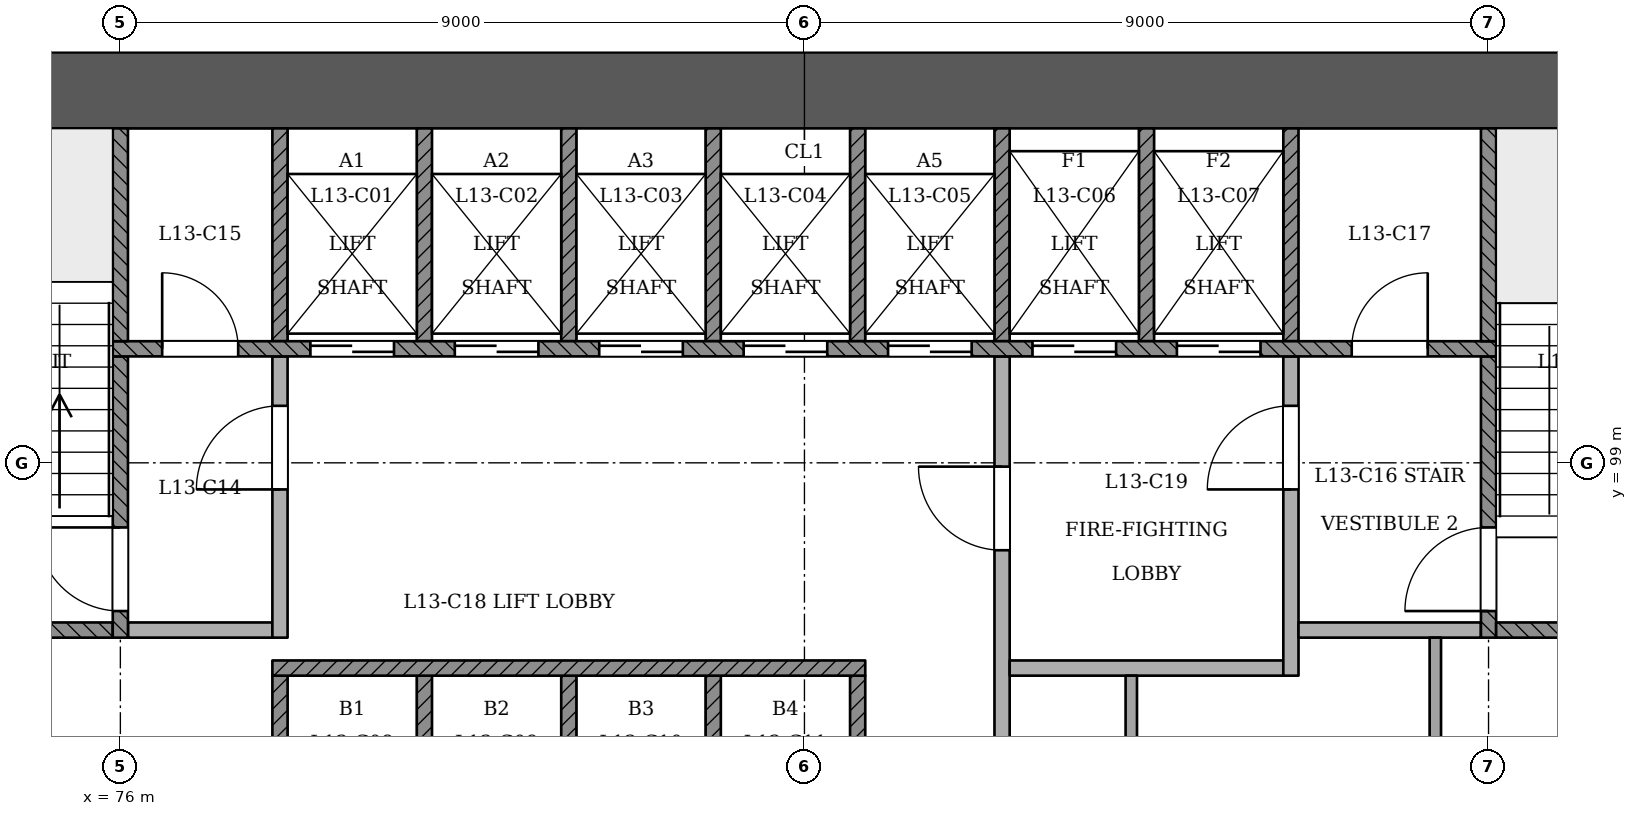
"""IFC4 building model, lengths in metres.
Left out: names, types, materials, properties, quantities, classifications, styles, units other than length and angle.
Written with IfcOpenShell. Run it as: python <this file> out.ifc"""

import sys

from ifc_helpers import new_model, si_unit, direction, frame, frame_2d, origin, place, context, subcontext, project, spatial, rectangle, extrude, element, fill, save


model = new_model("IFC4")
c1 = context("Model", 3, precision=1e-05, world=origin(), true_north=direction((0.0, 1.0)))
c2 = subcontext(c1, "Body", "Model", "MODEL_VIEW")
j1 = project(units=[si_unit("LENGTHUNIT", "METRE"), si_unit("PLANEANGLEUNIT", "RADIAN")], contexts=[c1])
p1 = place(None, origin())
s1 = spatial("IfcSite", under=j1, at=p1, CompositionType="ELEMENT")
p2 = place(p1, origin())
s2 = spatial("IfcBuilding", under=s1, at=p2, CompositionType="ELEMENT")
p3 = place(p2, frame((0.0, 0.0, 55.8)))
s3 = spatial("IfcBuildingStorey", under=s2, at=p3, CompositionType="ELEMENT", Elevation=55.8)
p4 = place(p3, frame((97.5, 103.9, 0.0), z_axis=(0.0, 0.0, 1.0), x_axis=(-1.0, 0.0, 0.0)))
e1 = element("IfcWall", 1, at=p4, inside=s3, PredefinedType="SHEAR", context=c2, shape_type="SweptSolid", body=[
    extrude(rectangle(XDim=25.5, YDim=1.0, at=frame_2d((12.75, 0.0))), origin(), (0.0, 0.0, 1.0), 3.6),
])
p5 = place(p3, frame((85.99, 58.932, 0.0), z_axis=(0.0, 0.0, 1.0), x_axis=(0.500001547762, 0.866024510182, 0.0)))
e2 = element("IfcWall", 2, at=p5, inside=s3, PredefinedType="PARTITIONING", context=c2, shape_type="SweptSolid", body=[
    extrude(rectangle(XDim=42.454, YDim=0.15, at=frame_2d((21.227, 0.0))), origin(), (0.0, 0.0, 1.0), 2.7),
])
p6 = place(p5, frame((3.577, 0.0, 0.0)))
e3 = element("IfcOpeningElement", 3, at=p6, cuts=e2, PredefinedType="OPENING", context=c2, shape_type="SweptSolid", body=[
    extrude(rectangle(XDim=1.2, YDim=2.1, at=frame_2d((0.6, 1.05))), frame((0.0, 0.085, 0.0), z_axis=(0.0, -1.0, 0.0), x_axis=(1.0, 0.0, 0.0)), (0.0, 0.0, 1.0), 0.171),
])
p7 = place(p5, frame((11.134, 0.0, 0.0)))
e4 = element("IfcOpeningElement", 4, at=p7, cuts=e2, PredefinedType="OPENING", context=c2, shape_type="SweptSolid", body=[
    extrude(rectangle(XDim=1.0, YDim=2.1, at=frame_2d((0.5, 1.05))), frame((0.0, 0.085, 0.0), z_axis=(0.0, -1.0, 0.0), x_axis=(1.0, 0.0, 0.0)), (0.0, 0.0, 1.0), 0.171),
])
p8 = place(p5, frame((13.575, 0.0, 0.0)))
e5 = element("IfcOpeningElement", 5, at=p8, cuts=e2, PredefinedType="OPENING", context=c2, shape_type="SweptSolid", body=[
    extrude(rectangle(XDim=1.0, YDim=2.1, at=frame_2d((0.5, 1.05))), frame((0.0, 0.085, 0.0), z_axis=(0.0, -1.0, 0.0), x_axis=(1.0, 0.0, 0.0)), (0.0, 0.0, 1.0), 0.171),
])
p9 = place(p5, frame((20.134, 0.0, 0.0)))
e6 = element("IfcOpeningElement", 6, at=p9, cuts=e2, PredefinedType="OPENING", context=c2, shape_type="SweptSolid", body=[
    extrude(rectangle(XDim=1.0, YDim=2.1, at=frame_2d((0.5, 1.05))), frame((0.0, 0.085, 0.0), z_axis=(0.0, -1.0, 0.0), x_axis=(1.0, 0.0, 0.0)), (0.0, 0.0, 1.0), 0.171),
])
p10 = place(p5, frame((22.575, 0.0, 0.0)))
e7 = element("IfcOpeningElement", 7, at=p10, cuts=e2, PredefinedType="OPENING", context=c2, shape_type="SweptSolid", body=[
    extrude(rectangle(XDim=1.0, YDim=2.1, at=frame_2d((0.5, 1.05))), frame((0.0, 0.085, 0.0), z_axis=(0.0, -1.0, 0.0), x_axis=(1.0, 0.0, 0.0)), (0.0, 0.0, 1.0), 0.171),
])
p11 = place(p5, frame((29.134, 0.0, 0.0)))
e8 = element("IfcOpeningElement", 8, at=p11, cuts=e2, PredefinedType="OPENING", context=c2, shape_type="SweptSolid", body=[
    extrude(rectangle(XDim=1.0, YDim=2.1, at=frame_2d((0.5, 1.05))), frame((0.0, 0.085, 0.0), z_axis=(0.0, -1.0, 0.0), x_axis=(1.0, 0.0, 0.0)), (0.0, 0.0, 1.0), 0.171),
])
p12 = place(p5, frame((31.575, 0.0, 0.0)))
e9 = element("IfcOpeningElement", 9, at=p12, cuts=e2, PredefinedType="OPENING", context=c2, shape_type="SweptSolid", body=[
    extrude(rectangle(XDim=1.0, YDim=2.1, at=frame_2d((0.5, 1.05))), frame((0.0, 0.085, 0.0), z_axis=(0.0, -1.0, 0.0), x_axis=(1.0, 0.0, 0.0)), (0.0, 0.0, 1.0), 0.171),
])
p13 = place(p5, frame((38.134, 0.0, 0.0)))
e10 = element("IfcOpeningElement", 10, at=p13, cuts=e2, PredefinedType="OPENING", context=c2, shape_type="SweptSolid", body=[
    extrude(rectangle(XDim=1.0, YDim=2.1, at=frame_2d((0.5, 1.05))), frame((0.0, 0.085, 0.0), z_axis=(0.0, -1.0, 0.0), x_axis=(1.0, 0.0, 0.0)), (0.0, 0.0, 1.0), 0.171),
])
p14 = place(p5, frame((41.161, 0.0, 0.0)))
e11 = element("IfcOpeningElement", 11, at=p14, cuts=e2, PredefinedType="OPENING", context=c2, shape_type="SweptSolid", body=[
    extrude(rectangle(XDim=1.0, YDim=2.1, at=frame_2d((0.5, 1.05))), frame((0.0, 0.085, 0.0), z_axis=(0.0, -1.0, 0.0), x_axis=(1.0, 0.0, 0.0)), (0.0, 0.0, 1.0), 0.171),
])
for number, where, z_axis, x_axis in (
    (12, (78.1, 93.4, 0.0), (0.0, 0.0, 1.0), (0.0, 1.0, 0.0)),
    (13, (80.0, 93.4, 0.0), (0.0, 0.0, 1.0), (0.0, 1.0, 0.0)),
    (14, (81.9, 93.4, 0.0), (0.0, 0.0, 1.0), (0.0, 1.0, 0.0)),
    (15, (83.8, 93.4, 0.0), (0.0, 0.0, 1.0), (0.0, 1.0, 0.0)),
    (16, (85.7, 93.4, 0.0), (0.0, 0.0, 1.0), (0.0, 1.0, 0.0)),
):
    element("IfcWall", number, at=place(p3, frame(where, z_axis=z_axis, x_axis=x_axis)), inside=s3, PredefinedType="SOLIDWALL", context=c2, shape_type="SweptSolid", body=[
        extrude(rectangle(XDim=2.8, YDim=0.2, at=frame_2d((1.4, 0.0))), origin(), (0.0, 0.0, 1.0), 3.1),
    ])
p15 = place(p3, frame((87.6, 93.4, 0.0), z_axis=(0.0, 0.0, 1.0), x_axis=(0.0, 1.0, 0.0)))
e17 = element("IfcWall", 17, at=p15, inside=s3, PredefinedType="PARTITIONING", context=c2, shape_type="SweptSolid", body=[
    extrude(rectangle(XDim=7.0, YDim=0.2, at=frame_2d((3.5, 0.0))), origin(), (0.0, 0.0, 1.0), 3.1),
])
p16 = place(p15, frame((4.45, 0.0, 0.0)))
e18 = element("IfcOpeningElement", 18, at=p16, cuts=e17, PredefinedType="OPENING", context=c2, shape_type="SweptSolid", body=[
    extrude(rectangle(XDim=1.1, YDim=2.1, at=frame_2d((0.55, 1.05))), frame((0.0, 0.11, 0.0), z_axis=(0.0, -1.0, 0.0), x_axis=(1.0, 0.0, 0.0)), (0.0, 0.0, 1.0), 0.221),
])
p17 = place(p3, frame((89.3, 93.4, 0.0), z_axis=(0.0, 0.0, 1.0), x_axis=(0.0, 1.0, 0.0)))
e19 = element("IfcWall", 19, at=p17, inside=s3, PredefinedType="PARTITIONING", context=c2, shape_type="SweptSolid", body=[
    extrude(rectangle(XDim=2.8, YDim=0.15, at=frame_2d((1.4, 0.0))), origin(), (0.0, 0.0, 1.0), 3.1),
])
p18 = place(p3, frame((93.3, 93.4, 0.0), z_axis=(0.0, 0.0, 1.0), x_axis=(0.0, 1.0, 0.0)))
e20 = element("IfcWall", 20, at=p18, inside=s3, PredefinedType="PARTITIONING", context=c2, shape_type="SweptSolid", body=[
    extrude(rectangle(XDim=3.3, YDim=0.15, at=frame_2d((1.65, 0.0))), origin(), (0.0, 0.0, 1.0), 3.1),
])
p19 = place(p3, frame((78.0, 96.3, 0.0), z_axis=(0.0, 0.0, 1.0), x_axis=(1.0, 0.0, 0.0)))
e21 = element("IfcWall", 21, at=p19, inside=s3, PredefinedType="SOLIDWALL", context=c2, shape_type="SweptSolid", body=[
    extrude(rectangle(XDim=7.8, YDim=0.2, at=frame_2d((3.9, 0.0))), origin(), (0.0, 0.0, 1.0), 3.1),
])
p20 = place(p3, frame((87.7, 96.3, 0.0), z_axis=(0.0, 0.0, 1.0), x_axis=(1.0, 0.0, 0.0)))
e22 = element("IfcWall", 22, at=p20, inside=s3, PredefinedType="PARTITIONING", context=c2, shape_type="SweptSolid", body=[
    extrude(rectangle(XDim=3.6, YDim=0.2, at=frame_2d((1.8, 0.0))), origin(), (0.0, 0.0, 1.0), 3.1),
])
p21 = place(p3, frame((91.4, 96.2, 0.0), z_axis=(0.0, 0.0, 1.0), x_axis=(0.0, 1.0, 0.0)))
e23 = element("IfcWall", 23, at=p21, inside=s3, PredefinedType="PARTITIONING", context=c2, shape_type="SweptSolid", body=[
    extrude(rectangle(XDim=4.2, YDim=0.2, at=frame_2d((2.1, 0.0))), origin(), (0.0, 0.0, 1.0), 3.1),
])
p22 = place(p21, frame((2.45, 0.0, 0.0)))
e24 = element("IfcOpeningElement", 24, at=p22, cuts=e23, PredefinedType="OPENING", context=c2, shape_type="SweptSolid", body=[
    extrude(rectangle(XDim=1.1, YDim=2.1, at=frame_2d((0.55, 1.05))), frame((0.0, 0.11, 0.0), z_axis=(0.0, -1.0, 0.0), x_axis=(1.0, 0.0, 0.0)), (0.0, 0.0, 1.0), 0.221),
])
p23 = place(p3, frame((73.0, 96.8, 0.0), z_axis=(0.0, 0.0, 1.0), x_axis=(1.0, 0.0, 0.0)))
e25 = element("IfcWall", 25, at=p23, inside=s3, PredefinedType="SOLIDWALL", context=c2, shape_type="SweptSolid", body=[
    extrude(rectangle(XDim=2.9, YDim=0.2, at=frame_2d((1.45, 0.0))), origin(), (0.0, 0.0, 1.0), 3.1),
])
p24 = place(p3, frame((76.0, 96.7, 0.0), z_axis=(0.0, 0.0, 1.0), x_axis=(0.0, 1.0, 0.0)))
e26 = element("IfcWall", 26, at=p24, inside=s3, PredefinedType="SOLIDWALL", context=c2, shape_type="SweptSolid", body=[
    extrude(rectangle(XDim=3.7, YDim=0.2, at=frame_2d((1.85, 0.0))), origin(), (0.0, 0.0, 1.0), 3.1),
])
p25 = place(p24, frame((0.35, 0.0, 0.0)))
e27 = element("IfcOpeningElement", 27, at=p25, cuts=e26, PredefinedType="OPENING", context=c2, shape_type="SweptSolid", body=[
    extrude(rectangle(XDim=1.1, YDim=2.1, at=frame_2d((0.55, 1.05))), frame((0.0, 0.11, 0.0), z_axis=(0.0, -1.0, 0.0), x_axis=(1.0, 0.0, 0.0)), (0.0, 0.0, 1.0), 0.221),
])
p26 = place(p3, frame((76.1, 96.8, 0.0), z_axis=(0.0, 0.0, 1.0), x_axis=(1.0, 0.0, 0.0)))
e28 = element("IfcWall", 28, at=p26, inside=s3, PredefinedType="PARTITIONING", context=c2, shape_type="SweptSolid", body=[
    extrude(rectangle(XDim=1.9, YDim=0.2, at=frame_2d((0.95, 0.0))), origin(), (0.0, 0.0, 1.0), 3.1),
])
p27 = place(p3, frame((78.1, 96.7, 0.0), z_axis=(0.0, 0.0, 1.0), x_axis=(0.0, 1.0, 0.0)))
e29 = element("IfcWall", 29, at=p27, inside=s3, PredefinedType="PARTITIONING", context=c2, shape_type="SweptSolid", body=[
    extrude(rectangle(XDim=3.7, YDim=0.2, at=frame_2d((1.85, 0.0))), origin(), (0.0, 0.0, 1.0), 3.1),
])
p28 = place(p27, frame((1.95, 0.0, 0.0)))
e30 = element("IfcOpeningElement", 30, at=p28, cuts=e29, PredefinedType="OPENING", context=c2, shape_type="SweptSolid", body=[
    extrude(rectangle(XDim=1.1, YDim=2.1, at=frame_2d((0.55, 1.05))), frame((0.0, 0.11, 0.0), z_axis=(0.0, -1.0, 0.0), x_axis=(1.0, 0.0, 0.0)), (0.0, 0.0, 1.0), 0.221),
])
p29 = place(p3, frame((91.5, 96.8, 0.0), z_axis=(0.0, 0.0, 1.0), x_axis=(1.0, 0.0, 0.0)))
e31 = element("IfcWall", 31, at=p29, inside=s3, PredefinedType="PARTITIONING", context=c2, shape_type="SweptSolid", body=[
    extrude(rectangle(XDim=2.4, YDim=0.2, at=frame_2d((1.2, 0.0))), origin(), (0.0, 0.0, 1.0), 3.1),
])
p30 = place(p3, frame((94.0, 96.7, 0.0), z_axis=(0.0, 0.0, 1.0), x_axis=(0.0, 1.0, 0.0)))
e32 = element("IfcWall", 32, at=p30, inside=s3, PredefinedType="SOLIDWALL", context=c2, shape_type="SweptSolid", body=[
    extrude(rectangle(XDim=3.7, YDim=0.2, at=frame_2d((1.85, 0.0))), origin(), (0.0, 0.0, 1.0), 3.1),
])
p31 = place(p30, frame((0.35, 0.0, 0.0)))
e33 = element("IfcOpeningElement", 33, at=p31, cuts=e32, PredefinedType="OPENING", context=c2, shape_type="SweptSolid", body=[
    extrude(rectangle(XDim=1.1, YDim=2.1, at=frame_2d((0.55, 1.05))), frame((0.0, 0.11, 0.0), z_axis=(0.0, -1.0, 0.0), x_axis=(1.0, 0.0, 0.0)), (0.0, 0.0, 1.0), 0.221),
])
p32 = place(p3, frame((94.1, 96.8, 0.0), z_axis=(0.0, 0.0, 1.0), x_axis=(1.0, 0.0, 0.0)))
e34 = element("IfcWall", 34, at=p32, inside=s3, PredefinedType="SOLIDWALL", context=c2, shape_type="SweptSolid", body=[
    extrude(rectangle(XDim=2.9, YDim=0.2, at=frame_2d((1.45, 0.0))), origin(), (0.0, 0.0, 1.0), 3.1),
])
p33 = place(p3, frame((75.9, 100.5, 0.0), z_axis=(0.0, 0.0, 1.0), x_axis=(1.0, 0.0, 0.0)))
e35 = element("IfcWall", 35, at=p33, inside=s3, PredefinedType="SOLIDWALL", context=c2, shape_type="SweptSolid", body=[
    extrude(rectangle(XDim=18.2, YDim=0.2, at=frame_2d((9.1, 0.0))), origin(), (0.0, 0.0, 1.0), 3.1),
])
p34 = place(p33, frame((2.6, 0.0, 0.0)))
e36 = element("IfcOpeningElement", 36, at=p34, cuts=e35, PredefinedType="OPENING", context=c2, shape_type="SweptSolid", body=[
    extrude(rectangle(XDim=1.1, YDim=2.1, at=frame_2d((0.55, 1.05))), frame((0.0, 0.11, 0.0), z_axis=(0.0, -1.0, 0.0), x_axis=(1.0, 0.0, 0.0)), (0.0, 0.0, 1.0), 0.221),
])
p35 = place(p33, frame((4.5, 0.0, 0.0)))
e37 = element("IfcOpeningElement", 37, at=p35, cuts=e35, PredefinedType="OPENING", context=c2, shape_type="SweptSolid", body=[
    extrude(rectangle(XDim=1.1, YDim=2.1, at=frame_2d((0.55, 1.05))), frame((0.0, 0.11, 0.0), z_axis=(0.0, -1.0, 0.0), x_axis=(1.0, 0.0, 0.0)), (0.0, 0.0, 1.0), 0.221),
])
p36 = place(p33, frame((6.4, 0.0, 0.0)))
e38 = element("IfcOpeningElement", 38, at=p36, cuts=e35, PredefinedType="OPENING", context=c2, shape_type="SweptSolid", body=[
    extrude(rectangle(XDim=1.1, YDim=2.1, at=frame_2d((0.55, 1.05))), frame((0.0, 0.11, 0.0), z_axis=(0.0, -1.0, 0.0), x_axis=(1.0, 0.0, 0.0)), (0.0, 0.0, 1.0), 0.221),
])
p37 = place(p33, frame((8.3, 0.0, 0.0)))
e39 = element("IfcOpeningElement", 39, at=p37, cuts=e35, PredefinedType="OPENING", context=c2, shape_type="SweptSolid", body=[
    extrude(rectangle(XDim=1.1, YDim=2.1, at=frame_2d((0.55, 1.05))), frame((0.0, 0.11, 0.0), z_axis=(0.0, -1.0, 0.0), x_axis=(1.0, 0.0, 0.0)), (0.0, 0.0, 1.0), 0.221),
])
p38 = place(p33, frame((10.2, 0.0, 0.0)))
e40 = element("IfcOpeningElement", 40, at=p38, cuts=e35, PredefinedType="OPENING", context=c2, shape_type="SweptSolid", body=[
    extrude(rectangle(XDim=1.1, YDim=2.1, at=frame_2d((0.55, 1.05))), frame((0.0, 0.11, 0.0), z_axis=(0.0, -1.0, 0.0), x_axis=(1.0, 0.0, 0.0)), (0.0, 0.0, 1.0), 0.221),
])
p39 = place(p33, frame((12.1, 0.0, 0.0)))
e41 = element("IfcOpeningElement", 41, at=p39, cuts=e35, PredefinedType="OPENING", context=c2, shape_type="SweptSolid", body=[
    extrude(rectangle(XDim=1.1, YDim=2.1, at=frame_2d((0.55, 1.05))), frame((0.0, 0.11, 0.0), z_axis=(0.0, -1.0, 0.0), x_axis=(1.0, 0.0, 0.0)), (0.0, 0.0, 1.0), 0.221),
])
p40 = place(p33, frame((14.0, 0.0, 0.0)))
e42 = element("IfcOpeningElement", 42, at=p40, cuts=e35, PredefinedType="OPENING", context=c2, shape_type="SweptSolid", body=[
    extrude(rectangle(XDim=1.1, YDim=2.1, at=frame_2d((0.55, 1.05))), frame((0.0, 0.11, 0.0), z_axis=(0.0, -1.0, 0.0), x_axis=(1.0, 0.0, 0.0)), (0.0, 0.0, 1.0), 0.221),
])
p41 = place(p33, frame((0.65, 0.0, 0.0)))
e43 = element("IfcOpeningElement", 43, at=p41, cuts=e35, PredefinedType="OPENING", context=c2, shape_type="SweptSolid", body=[
    extrude(rectangle(XDim=1.0, YDim=2.1, at=frame_2d((0.5, 1.05))), frame((0.0, 0.11, 0.0), z_axis=(0.0, -1.0, 0.0), x_axis=(1.0, 0.0, 0.0)), (0.0, 0.0, 1.0), 0.221),
])
p42 = place(p33, frame((16.3, 0.0, 0.0)))
e44 = element("IfcOpeningElement", 44, at=p42, cuts=e35, PredefinedType="OPENING", context=c2, shape_type="SweptSolid", body=[
    extrude(rectangle(XDim=1.0, YDim=2.1, at=frame_2d((0.5, 1.05))), frame((0.0, 0.11, 0.0), z_axis=(0.0, -1.0, 0.0), x_axis=(1.0, 0.0, 0.0)), (0.0, 0.0, 1.0), 0.221),
])
for number, where, z_axis, x_axis in (
    (45, (76.0, 100.6, 0.0), (0.0, 0.0, 1.0), (0.0, 1.0, 0.0)),
    (46, (78.1, 100.6, 0.0), (0.0, 0.0, 1.0), (0.0, 1.0, 0.0)),
    (47, (80.0, 100.6, 0.0), (0.0, 0.0, 1.0), (0.0, 1.0, 0.0)),
    (48, (81.9, 100.6, 0.0), (0.0, 0.0, 1.0), (0.0, 1.0, 0.0)),
    (49, (83.8, 100.6, 0.0), (0.0, 0.0, 1.0), (0.0, 1.0, 0.0)),
    (50, (85.7, 100.6, 0.0), (0.0, 0.0, 1.0), (0.0, 1.0, 0.0)),
    (51, (87.6, 100.6, 0.0), (0.0, 0.0, 1.0), (0.0, 1.0, 0.0)),
    (52, (89.5, 100.6, 0.0), (0.0, 0.0, 1.0), (0.0, 1.0, 0.0)),
    (53, (91.4, 100.6, 0.0), (0.0, 0.0, 1.0), (0.0, 1.0, 0.0)),
    (54, (94.0, 100.6, 0.0), (0.0, 0.0, 1.0), (0.0, 1.0, 0.0)),
):
    element("IfcWall", number, at=place(p3, frame(where, z_axis=z_axis, x_axis=x_axis)), inside=s3, PredefinedType="SOLIDWALL", context=c2, shape_type="SweptSolid", body=[
        extrude(rectangle(XDim=2.8, YDim=0.2, at=frame_2d((1.4, 0.0))), origin(), (0.0, 0.0, 1.0), 3.1),
    ])
p43 = place(p34, origin())
e55 = element("IfcDoor", 55, at=p43, inside=s3, OperationType="SLIDING_TO_RIGHT", PredefinedType="NOTDEFINED", context=c2, shape_type="SweptSolid", body=[
    extrude(rectangle(XDim=1.1, YDim=2.1, at=frame_2d((0.55, 1.05))), frame((0.0, 0.025, 0.0), z_axis=(0.0, -1.0, 0.0), x_axis=(1.0, 0.0, 0.0)), (0.0, 0.0, 1.0), 0.05),
])
fill(e36, e55)
p44 = place(p35, origin())
e56 = element("IfcDoor", 56, at=p44, inside=s3, OperationType="SLIDING_TO_LEFT", PredefinedType="NOTDEFINED", context=c2, shape_type="SweptSolid", body=[
    extrude(rectangle(XDim=1.1, YDim=2.1, at=frame_2d((0.55, 1.05))), frame((0.0, 0.025, 0.0), z_axis=(0.0, -1.0, 0.0), x_axis=(1.0, 0.0, 0.0)), (0.0, 0.0, 1.0), 0.05),
])
fill(e37, e56)
p45 = place(p36, origin())
e57 = element("IfcDoor", 57, at=p45, inside=s3, OperationType="SLIDING_TO_RIGHT", PredefinedType="NOTDEFINED", context=c2, shape_type="SweptSolid", body=[
    extrude(rectangle(XDim=1.1, YDim=2.1, at=frame_2d((0.55, 1.05))), frame((0.0, 0.025, 0.0), z_axis=(0.0, -1.0, 0.0), x_axis=(1.0, 0.0, 0.0)), (0.0, 0.0, 1.0), 0.05),
])
fill(e38, e57)
p46 = place(p37, origin())
e58 = element("IfcDoor", 58, at=p46, inside=s3, OperationType="SLIDING_TO_LEFT", PredefinedType="NOTDEFINED", context=c2, shape_type="SweptSolid", body=[
    extrude(rectangle(XDim=1.1, YDim=2.1, at=frame_2d((0.55, 1.05))), frame((0.0, 0.025, 0.0), z_axis=(0.0, -1.0, 0.0), x_axis=(1.0, 0.0, 0.0)), (0.0, 0.0, 1.0), 0.05),
])
fill(e39, e58)
p47 = place(p38, origin())
e59 = element("IfcDoor", 59, at=p47, inside=s3, OperationType="SLIDING_TO_RIGHT", PredefinedType="NOTDEFINED", context=c2, shape_type="SweptSolid", body=[
    extrude(rectangle(XDim=1.1, YDim=2.1, at=frame_2d((0.55, 1.05))), frame((0.0, 0.025, 0.0), z_axis=(0.0, -1.0, 0.0), x_axis=(1.0, 0.0, 0.0)), (0.0, 0.0, 1.0), 0.05),
])
fill(e40, e59)
p48 = place(p39, origin())
e60 = element("IfcDoor", 60, at=p48, inside=s3, OperationType="SLIDING_TO_RIGHT", PredefinedType="NOTDEFINED", context=c2, shape_type="SweptSolid", body=[
    extrude(rectangle(XDim=1.1, YDim=2.1, at=frame_2d((0.55, 1.05))), frame((0.0, 0.025, 0.0), z_axis=(0.0, -1.0, 0.0), x_axis=(1.0, 0.0, 0.0)), (0.0, 0.0, 1.0), 0.05),
])
fill(e41, e60)
p49 = place(p40, origin())
e61 = element("IfcDoor", 61, at=p49, inside=s3, OperationType="SLIDING_TO_LEFT", PredefinedType="NOTDEFINED", context=c2, shape_type="SweptSolid", body=[
    extrude(rectangle(XDim=1.1, YDim=2.1, at=frame_2d((0.55, 1.05))), frame((0.0, 0.025, 0.0), z_axis=(0.0, -1.0, 0.0), x_axis=(1.0, 0.0, 0.0)), (0.0, 0.0, 1.0), 0.05),
])
fill(e42, e61)
p50 = place(p25, origin())
e62 = element("IfcDoor", 62, at=p50, inside=s3, OperationType="SINGLE_SWING_RIGHT", PredefinedType="NOTDEFINED", context=c2, shape_type="SweptSolid", body=[
    extrude(rectangle(XDim=1.1, YDim=2.1, at=frame_2d((0.55, 1.05))), frame((0.0, 0.025, 0.0), z_axis=(0.0, -1.0, 0.0), x_axis=(1.0, 0.0, 0.0)), (0.0, 0.0, 1.0), 0.05),
])
fill(e27, e62)
p51 = place(p31, origin())
e63 = element("IfcDoor", 63, at=p51, inside=s3, OperationType="SINGLE_SWING_LEFT", PredefinedType="NOTDEFINED", context=c2, shape_type="SweptSolid", body=[
    extrude(rectangle(XDim=1.1, YDim=2.1, at=frame_2d((0.55, 1.05))), frame((0.0, 0.025, 0.0), z_axis=(0.0, -1.0, 0.0), x_axis=(1.0, 0.0, 0.0)), (0.0, 0.0, 1.0), 0.05),
])
fill(e33, e63)
p52 = place(p28, origin())
e64 = element("IfcDoor", 64, at=p52, inside=s3, OperationType="SINGLE_SWING_LEFT", PredefinedType="NOTDEFINED", context=c2, shape_type="SweptSolid", body=[
    extrude(rectangle(XDim=1.1, YDim=2.1, at=frame_2d((0.55, 1.05))), frame((0.0, 0.025, 0.0), z_axis=(0.0, -1.0, 0.0), x_axis=(1.0, 0.0, 0.0)), (0.0, 0.0, 1.0), 0.05),
])
fill(e30, e64)
p53 = place(p16, origin())
e65 = element("IfcDoor", 65, at=p53, inside=s3, OperationType="SINGLE_SWING_RIGHT", PredefinedType="NOTDEFINED", context=c2, shape_type="SweptSolid", body=[
    extrude(rectangle(XDim=1.1, YDim=2.1, at=frame_2d((0.55, 1.05))), frame((0.0, 0.025, 0.0), z_axis=(0.0, -1.0, 0.0), x_axis=(1.0, 0.0, 0.0)), (0.0, 0.0, 1.0), 0.05),
])
fill(e18, e65)
p54 = place(p22, origin())
e66 = element("IfcDoor", 66, at=p54, inside=s3, OperationType="SINGLE_SWING_LEFT", PredefinedType="NOTDEFINED", context=c2, shape_type="SweptSolid", body=[
    extrude(rectangle(XDim=1.1, YDim=2.1, at=frame_2d((0.55, 1.05))), frame((0.0, 0.025, 0.0), z_axis=(0.0, -1.0, 0.0), x_axis=(1.0, 0.0, 0.0)), (0.0, 0.0, 1.0), 0.05),
])
fill(e24, e66)
p55 = place(p41, origin())
e67 = element("IfcDoor", 67, at=p55, inside=s3, OperationType="SINGLE_SWING_LEFT", PredefinedType="NOTDEFINED", context=c2, shape_type="SweptSolid", body=[
    extrude(rectangle(XDim=1.0, YDim=2.1, at=frame_2d((0.5, 1.05))), frame((0.0, 0.025, 0.0), z_axis=(0.0, -1.0, 0.0), x_axis=(1.0, 0.0, 0.0)), (0.0, 0.0, 1.0), 0.05),
])
fill(e43, e67)
p56 = place(p42, origin())
e68 = element("IfcDoor", 68, at=p56, inside=s3, OperationType="SINGLE_SWING_RIGHT", PredefinedType="NOTDEFINED", context=c2, shape_type="SweptSolid", body=[
    extrude(rectangle(XDim=1.0, YDim=2.1, at=frame_2d((0.5, 1.05))), frame((0.0, 0.025, 0.0), z_axis=(0.0, -1.0, 0.0), x_axis=(1.0, 0.0, 0.0)), (0.0, 0.0, 1.0), 0.05),
])
fill(e44, e68)
save(model, sys.argv[1])
